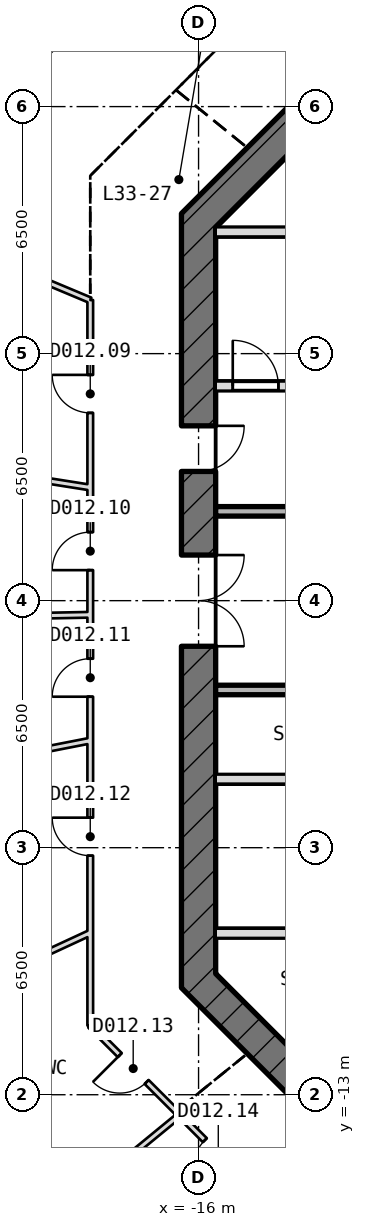
"""IFC4 building model, lengths in metres.
Left out: names, types, materials, properties, quantities, classifications, styles, units other than length and angle.
Written with IfcOpenShell. Run it as: python <this file> out.ifc"""

import sys

from ifc_helpers import new_model, si_unit, direction, frame, frame_2d, origin, place, context, subcontext, project, spatial, rectangle, extrude, element, fill, save


model = new_model("IFC4")
c1 = context("Model", 3, precision=1e-05, world=origin(), true_north=direction((0.0, 1.0)))
c2 = subcontext(c1, "Body", "Model", "MODEL_VIEW")
j1 = project(units=[si_unit("LENGTHUNIT", "METRE"), si_unit("PLANEANGLEUNIT", "RADIAN")], contexts=[c1])
p1 = place(None, origin())
s1 = spatial("IfcSite", under=j1, at=p1, CompositionType="ELEMENT")
p2 = place(p1, origin())
s2 = spatial("IfcBuilding", under=s1, at=p2, CompositionType="ELEMENT")
p3 = place(p2, frame((0.0, 0.0, 155.65)))
s3 = spatial("IfcBuildingStorey", under=s2, at=p3, CompositionType="ELEMENT", Elevation=155.65)
p4 = place(p3, frame((-12.868, 13.132, -0.25), z_axis=(0.0, 0.0, 1.0), x_axis=(-0.707106781187, -0.707106781187, 0.0)))
e1 = element("IfcWall", 1, at=p4, inside=s3, PredefinedType="SHEAR", context=c2, shape_type="SweptSolid", body=[
    extrude(rectangle(XDim=4.615, YDim=0.9, at=frame_2d((2.308, 0.0))), origin(), (0.0, 0.0, 1.0), 5.47),
])
p5 = place(p3, frame((-16.0, 10.186, -0.25), z_axis=(0.0, 0.0, 1.0), x_axis=(0.0, -1.0, 0.0)))
e2 = element("IfcWall", 2, at=p5, inside=s3, PredefinedType="SHEAR", context=c2, shape_type="SweptSolid", body=[
    extrude(rectangle(XDim=20.373, YDim=0.9, at=frame_2d((10.186, 0.0))), origin(), (0.0, 0.0, 1.0), 5.47),
])
p6 = place(p5, frame((8.986, 0.0, 0.25)))
e3 = element("IfcOpeningElement", 3, at=p6, cuts=e2, PredefinedType="OPENING", context=c2, shape_type="SweptSolid", body=[
    extrude(rectangle(XDim=2.4, YDim=2.1, at=frame_2d((1.2, 1.05))), frame((0.0, 0.46, 0.0), z_axis=(0.0, -1.0, 0.0), x_axis=(1.0, 0.0, 0.0)), (0.0, 0.0, 1.0), 0.92),
])
p7 = place(p5, frame((5.586, 0.0, 0.25)))
e4 = element("IfcOpeningElement", 4, at=p7, cuts=e2, PredefinedType="OPENING", context=c2, shape_type="SweptSolid", body=[
    extrude(rectangle(XDim=1.2, YDim=2.1, at=frame_2d((0.6, 1.05))), frame((0.0, 0.46, 0.0), z_axis=(0.0, -1.0, 0.0), x_axis=(1.0, 0.0, 0.0)), (0.0, 0.0, 1.0), 0.92),
])
p8 = place(p3, frame((-16.132, -9.868, -0.25), z_axis=(0.0, 0.0, 1.0), x_axis=(0.707106781187, -0.707106781187, 0.0)))
e5 = element("IfcWall", 5, at=p8, inside=s3, PredefinedType="SHEAR", context=c2, shape_type="SweptSolid", body=[
    extrude(rectangle(XDim=4.615, YDim=0.9, at=frame_2d((2.308, 0.0))), origin(), (0.0, 0.0, 1.0), 5.47),
])
p9 = place(p3, frame((-15.55, -8.75, -0.25), z_axis=(0.0, 0.0, 1.0), x_axis=(1.0, 0.0, 0.0)))
e6 = element("IfcWall", 6, at=p9, inside=s3, PredefinedType="SHEAR", context=c2, shape_type="SweptSolid", body=[
    extrude(rectangle(XDim=7.0, YDim=0.25, at=frame_2d((3.5, 0.0))), origin(), (0.0, 0.0, 1.0), 5.47),
])
p10 = place(p9, frame((5.5, 0.0, 0.25)))
e7 = element("IfcOpeningElement", 7, at=p10, cuts=e6, PredefinedType="OPENING", context=c2, shape_type="SweptSolid", body=[
    extrude(rectangle(XDim=1.2, YDim=2.1, at=frame_2d((0.6, 1.05))), frame((0.0, 0.135, 0.0), z_axis=(0.0, -1.0, 0.0), x_axis=(1.0, 0.0, 0.0)), (0.0, 0.0, 1.0), 0.27),
])
p11 = place(p3, frame((-15.55, -4.7, -0.25), z_axis=(0.0, 0.0, 1.0), x_axis=(1.0, 0.0, 0.0)))
e8 = element("IfcWall", 8, at=p11, inside=s3, PredefinedType="SHEAR", context=c2, shape_type="SweptSolid", body=[
    extrude(rectangle(XDim=7.0, YDim=0.25, at=frame_2d((3.5, 0.0))), origin(), (0.0, 0.0, 1.0), 5.47),
])
for number, where, z_axis, x_axis in (
    (9, (-15.55, -2.35, 0.0), (0.0, 0.0, 1.0), (1.0, 0.0, 0.0)),
    (10, (-15.55, 2.35, 0.0), (0.0, 0.0, 1.0), (1.0, 0.0, 0.0)),
):
    element("IfcWall", number, at=place(p3, frame(where, z_axis=z_axis, x_axis=x_axis)), inside=s3, PredefinedType="STANDARD", context=c2, shape_type="SweptSolid", body=[
        extrude(rectangle(XDim=7.15, YDim=0.25, at=frame_2d((3.575, 0.0))), origin(), (0.0, 0.0, 1.0), 5.22),
    ])
p12 = place(p3, frame((-15.55, 5.65, -0.25), z_axis=(0.0, 0.0, 1.0), x_axis=(1.0, 0.0, 0.0)))
e11 = element("IfcWall", 11, at=p12, inside=s3, PredefinedType="SHEAR", context=c2, shape_type="SweptSolid", body=[
    extrude(rectangle(XDim=7.0, YDim=0.25, at=frame_2d((3.5, 0.0))), origin(), (0.0, 0.0, 1.0), 5.47),
])
p13 = place(p12, frame((0.45, 0.0, 0.25)))
e12 = element("IfcOpeningElement", 12, at=p13, cuts=e11, PredefinedType="OPENING", context=c2, shape_type="SweptSolid", body=[
    extrude(rectangle(XDim=1.2, YDim=2.1, at=frame_2d((0.6, 1.05))), frame((0.0, 0.135, 0.0), z_axis=(0.0, -1.0, 0.0), x_axis=(1.0, 0.0, 0.0)), (0.0, 0.0, 1.0), 0.27),
])
p14 = place(p3, frame((-15.55, 9.7, -0.25), z_axis=(0.0, 0.0, 1.0), x_axis=(1.0, 0.0, 0.0)))
e13 = element("IfcWall", 13, at=p14, inside=s3, PredefinedType="SHEAR", context=c2, shape_type="SweptSolid", body=[
    extrude(rectangle(XDim=7.0, YDim=0.25, at=frame_2d((3.5, 0.0))), origin(), (0.0, 0.0, 1.0), 5.47),
])
p15 = place(p3, frame((-30.447, -0.6, 0.0), z_axis=(0.0, 0.0, 1.0), x_axis=(0.999805915994, 0.019701023923, 0.0)))
e14 = element("IfcWall", 14, at=p15, inside=s3, PredefinedType="PARTITIONING", context=c2, shape_type="SweptSolid", body=[
    extrude(rectangle(XDim=11.599, YDim=0.15, at=frame_2d((5.8, 0.0))), origin(), (0.0, 0.0, 1.0), 5.22),
])
p16 = place(p3, frame((-21.95, 12.465, 0.0), z_axis=(0.0, 0.0, 1.0), x_axis=(0.707106781187, 0.707106781187, 0.0)))
e15 = element("IfcWall", 15, at=p16, inside=s3, PredefinedType="PARTITIONING", context=c2, shape_type="SweptSolid", body=[
    extrude(rectangle(XDim=9.172, YDim=0.15, at=frame_2d((4.586, 0.0))), origin(), (0.0, 0.0, 1.0), 5.22),
])
p17 = place(p16, frame((2.942, 0.0, 0.0)))
e16 = element("IfcOpeningElement", 16, at=p17, cuts=e15, PredefinedType="OPENING", context=c2, shape_type="SweptSolid", body=[
    extrude(rectangle(XDim=1.0, YDim=2.1, at=frame_2d((0.5, 1.05))), frame((0.0, 0.085, 0.0), z_axis=(0.0, -1.0, 0.0), x_axis=(1.0, 0.0, 0.0)), (0.0, 0.0, 1.0), 0.17),
])
p18 = place(p3, frame((-18.85, -3.688, 0.0), z_axis=(0.0, 0.0, 1.0), x_axis=(0.0, 1.0, 0.0)))
e17 = element("IfcWall", 17, at=p18, inside=s3, PredefinedType="PARTITIONING", context=c2, shape_type="SweptSolid", body=[
    extrude(rectangle(XDim=11.598, YDim=0.15, at=frame_2d((5.799, 0.0))), origin(), (0.0, 0.0, 1.0), 5.22),
])
p19 = place(p18, frame((8.629, 0.0, 0.0)))
e18 = element("IfcOpeningElement", 18, at=p19, cuts=e17, PredefinedType="OPENING", context=c2, shape_type="SweptSolid", body=[
    extrude(rectangle(XDim=1.0, YDim=2.1, at=frame_2d((0.5, 1.05))), frame((0.0, 0.085, 0.0), z_axis=(0.0, -1.0, 0.0), x_axis=(1.0, 0.0, 0.0)), (0.0, 0.0, 1.0), 0.17),
])
p20 = place(p18, frame((4.491, 0.0, 0.0)))
e19 = element("IfcOpeningElement", 19, at=p20, cuts=e17, PredefinedType="OPENING", context=c2, shape_type="SweptSolid", body=[
    extrude(rectangle(XDim=1.0, YDim=2.1, at=frame_2d((0.5, 1.05))), frame((0.0, 0.085, 0.0), z_axis=(0.0, -1.0, 0.0), x_axis=(1.0, 0.0, 0.0)), (0.0, 0.0, 1.0), 0.17),
])
p21 = place(p18, frame((1.161, 0.0, 0.0)))
e20 = element("IfcOpeningElement", 20, at=p21, cuts=e17, PredefinedType="OPENING", context=c2, shape_type="SweptSolid", body=[
    extrude(rectangle(XDim=1.0, YDim=2.1, at=frame_2d((0.5, 1.05))), frame((0.0, 0.085, 0.0), z_axis=(0.0, -1.0, 0.0), x_axis=(1.0, 0.0, 0.0)), (0.0, 0.0, 1.0), 0.17),
])
p22 = place(p3, frame((-18.85, 7.905, 0.0), z_axis=(0.0, 0.0, 1.0), x_axis=(-0.922196281158, 0.386722147049, 0.0)))
e21 = element("IfcWall", 21, at=p22, inside=s3, PredefinedType="PARTITIONING", context=c2, shape_type="SweptSolid", body=[
    extrude(rectangle(XDim=7.394, YDim=0.15, at=frame_2d((3.697, 0.0))), origin(), (0.0, 0.0, 1.0), 4.684),
])
p23 = place(p3, frame((-18.85, 2.977, 0.0), z_axis=(0.0, 0.0, 1.0), x_axis=(-0.987756177072, 0.156005559696, 0.0)))
e22 = element("IfcWall", 22, at=p23, inside=s3, PredefinedType="PARTITIONING", context=c2, shape_type="SweptSolid", body=[
    extrude(rectangle(XDim=9.625, YDim=0.15, at=frame_2d((4.812, 0.0))), origin(), (0.0, 0.0, 1.0), 4.608),
])
p24 = place(p3, frame((-28.381, -5.545, 0.0), z_axis=(0.0, 0.0, 1.0), x_axis=(0.981440307059, 0.191767890116, 0.0)))
e23 = element("IfcWall", 23, at=p24, inside=s3, PredefinedType="PARTITIONING", context=c2, shape_type="SweptSolid", body=[
    extrude(rectangle(XDim=9.711, YDim=0.15, at=frame_2d((4.855, 0.0))), origin(), (0.0, 0.0, 1.0), 4.608),
])
p25 = place(p3, frame((-25.691, -11.907, 0.0), z_axis=(0.0, 0.0, 1.0), x_axis=(0.90728349123, 0.420519519809, 0.0)))
e24 = element("IfcWall", 24, at=p25, inside=s3, PredefinedType="PARTITIONING", context=c2, shape_type="SweptSolid", body=[
    extrude(rectangle(XDim=7.541, YDim=0.15, at=frame_2d((3.77, 0.0))), origin(), (0.0, 0.0, 1.0), 4.684),
])
p26 = place(p3, frame((-22.506, -18.46, 0.0), z_axis=(0.0, 0.0, 1.0), x_axis=(0.773199383517, 0.634163002175, 0.0)))
e25 = element("IfcWall", 25, at=p26, inside=s3, PredefinedType="PARTITIONING", context=c2, shape_type="SweptSolid", body=[
    extrude(rectangle(XDim=7.77, YDim=0.15, at=frame_2d((3.885, 0.0))), origin(), (0.0, 0.0, 1.0), 5.22),
])
p27 = place(p3, frame((-18.85, -11.18, 0.0), z_axis=(0.0, 0.0, 1.0), x_axis=(0.0, 1.0, 0.0)))
e26 = element("IfcWall", 26, at=p27, inside=s3, PredefinedType="PARTITIONING", context=c2, shape_type="SweptSolid", body=[
    extrude(rectangle(XDim=7.502, YDim=0.15, at=frame_2d((3.751, 0.0))), origin(), (0.0, 0.0, 1.0), 5.22),
])
p28 = place(p27, frame((4.471, 0.0, 0.0)))
e27 = element("IfcOpeningElement", 27, at=p28, cuts=e26, PredefinedType="OPENING", context=c2, shape_type="SweptSolid", body=[
    extrude(rectangle(XDim=1.0, YDim=2.1, at=frame_2d((0.5, 1.05))), frame((0.0, 0.085, 0.0), z_axis=(0.0, -1.0, 0.0), x_axis=(1.0, 0.0, 0.0)), (0.0, 0.0, 1.0), 0.17),
])
p29 = place(p3, frame((-14.46, -15.57, 0.0), z_axis=(0.0, 0.0, 1.0), x_axis=(-0.707106781187, 0.707106781187, 0.0)))
e28 = element("IfcWall", 28, at=p29, inside=s3, PredefinedType="PARTITIONING", context=c2, shape_type="SweptSolid", body=[
    extrude(rectangle(XDim=6.208, YDim=0.15, at=frame_2d((3.104, 0.0))), origin(), (0.0, 0.0, 1.0), 5.22),
])
p30 = place(p29, frame((4.11, 0.0, 0.0)))
e29 = element("IfcOpeningElement", 29, at=p30, cuts=e28, PredefinedType="OPENING", context=c2, shape_type="SweptSolid", body=[
    extrude(rectangle(XDim=1.0, YDim=2.1, at=frame_2d((0.5, 1.05))), frame((0.0, 0.085, 0.0), z_axis=(0.0, -1.0, 0.0), x_axis=(1.0, 0.0, 0.0)), (0.0, 0.0, 1.0), 0.17),
])
p31 = place(p29, frame((0.943, 0.0, 0.0)))
e30 = element("IfcOpeningElement", 30, at=p31, cuts=e28, PredefinedType="OPENING", context=c2, shape_type="SweptSolid", body=[
    extrude(rectangle(XDim=1.0, YDim=2.1, at=frame_2d((0.5, 1.05))), frame((0.0, 0.085, 0.0), z_axis=(0.0, -1.0, 0.0), x_axis=(1.0, 0.0, 0.0)), (0.0, 0.0, 1.0), 0.17),
])
p32 = place(p13, origin())
e31 = element("IfcDoor", 31, at=p32, inside=s3, OperationType="SINGLE_SWING_RIGHT", PredefinedType="DOOR", context=c2, shape_type="SweptSolid", body=[
    extrude(rectangle(XDim=1.2, YDim=2.1, at=frame_2d((0.6, 1.05))), frame((0.0, 0.025, 0.0), z_axis=(0.0, -1.0, 0.0), x_axis=(1.0, 0.0, 0.0)), (0.0, 0.0, 1.0), 0.05),
])
fill(e12, e31)
p33 = place(p6, origin())
e32 = element("IfcDoor", 32, at=p33, inside=s3, OperationType="DOUBLE_DOOR_SINGLE_SWING", PredefinedType="DOOR", context=c2, shape_type="SweptSolid", body=[
    extrude(rectangle(XDim=2.4, YDim=2.1, at=frame_2d((1.2, 1.05))), frame((0.0, 0.025, 0.0), z_axis=(0.0, -1.0, 0.0), x_axis=(1.0, 0.0, 0.0)), (0.0, 0.0, 1.0), 0.05),
])
fill(e3, e32)
p34 = place(p7, origin())
e33 = element("IfcDoor", 33, at=p34, inside=s3, OperationType="SINGLE_SWING_RIGHT", PredefinedType="DOOR", context=c2, shape_type="SweptSolid", body=[
    extrude(rectangle(XDim=1.2, YDim=2.1, at=frame_2d((0.6, 1.05))), frame((0.0, 0.025, 0.0), z_axis=(0.0, -1.0, 0.0), x_axis=(1.0, 0.0, 0.0)), (0.0, 0.0, 1.0), 0.05),
])
fill(e4, e33)
p35 = place(p19, origin())
e34 = element("IfcDoor", 34, at=p35, inside=s3, OperationType="SINGLE_SWING_RIGHT", PredefinedType="DOOR", context=c2, shape_type="SweptSolid", body=[
    extrude(rectangle(XDim=1.0, YDim=2.1, at=frame_2d((0.5, 1.05))), frame((0.0, 0.025, 0.0), z_axis=(0.0, -1.0, 0.0), x_axis=(1.0, 0.0, 0.0)), (0.0, 0.0, 1.0), 0.05),
])
fill(e18, e34)
p36 = place(p20, origin())
e35 = element("IfcDoor", 35, at=p36, inside=s3, OperationType="SINGLE_SWING_RIGHT", PredefinedType="DOOR", context=c2, shape_type="SweptSolid", body=[
    extrude(rectangle(XDim=1.0, YDim=2.1, at=frame_2d((0.5, 1.05))), frame((0.0, 0.025, 0.0), z_axis=(0.0, -1.0, 0.0), x_axis=(1.0, 0.0, 0.0)), (0.0, 0.0, 1.0), 0.05),
])
fill(e19, e35)
p37 = place(p21, origin())
e36 = element("IfcDoor", 36, at=p37, inside=s3, OperationType="SINGLE_SWING_RIGHT", PredefinedType="DOOR", context=c2, shape_type="SweptSolid", body=[
    extrude(rectangle(XDim=1.0, YDim=2.1, at=frame_2d((0.5, 1.05))), frame((0.0, 0.025, 0.0), z_axis=(0.0, -1.0, 0.0), x_axis=(1.0, 0.0, 0.0)), (0.0, 0.0, 1.0), 0.05),
])
fill(e20, e36)
p38 = place(p28, origin())
e37 = element("IfcDoor", 37, at=p38, inside=s3, OperationType="SINGLE_SWING_RIGHT", PredefinedType="DOOR", context=c2, shape_type="SweptSolid", body=[
    extrude(rectangle(XDim=1.0, YDim=2.1, at=frame_2d((0.5, 1.05))), frame((0.0, 0.025, 0.0), z_axis=(0.0, -1.0, 0.0), x_axis=(1.0, 0.0, 0.0)), (0.0, 0.0, 1.0), 0.05),
])
fill(e27, e37)
p39 = place(p30, origin())
e38 = element("IfcDoor", 38, at=p39, inside=s3, OperationType="SINGLE_SWING_RIGHT", PredefinedType="DOOR", context=c2, shape_type="SweptSolid", body=[
    extrude(rectangle(XDim=1.0, YDim=2.1, at=frame_2d((0.5, 1.05))), frame((0.0, 0.025, 0.0), z_axis=(0.0, -1.0, 0.0), x_axis=(1.0, 0.0, 0.0)), (0.0, 0.0, 1.0), 0.05),
])
fill(e29, e38)
p40 = place(p31, origin())
e39 = element("IfcDoor", 39, at=p40, inside=s3, OperationType="SINGLE_SWING_RIGHT", PredefinedType="DOOR", context=c2, shape_type="SweptSolid", body=[
    extrude(rectangle(XDim=1.0, YDim=2.1, at=frame_2d((0.5, 1.05))), frame((0.0, 0.025, 0.0), z_axis=(0.0, -1.0, 0.0), x_axis=(1.0, 0.0, 0.0)), (0.0, 0.0, 1.0), 0.05),
])
fill(e30, e39)
save(model, sys.argv[1])
